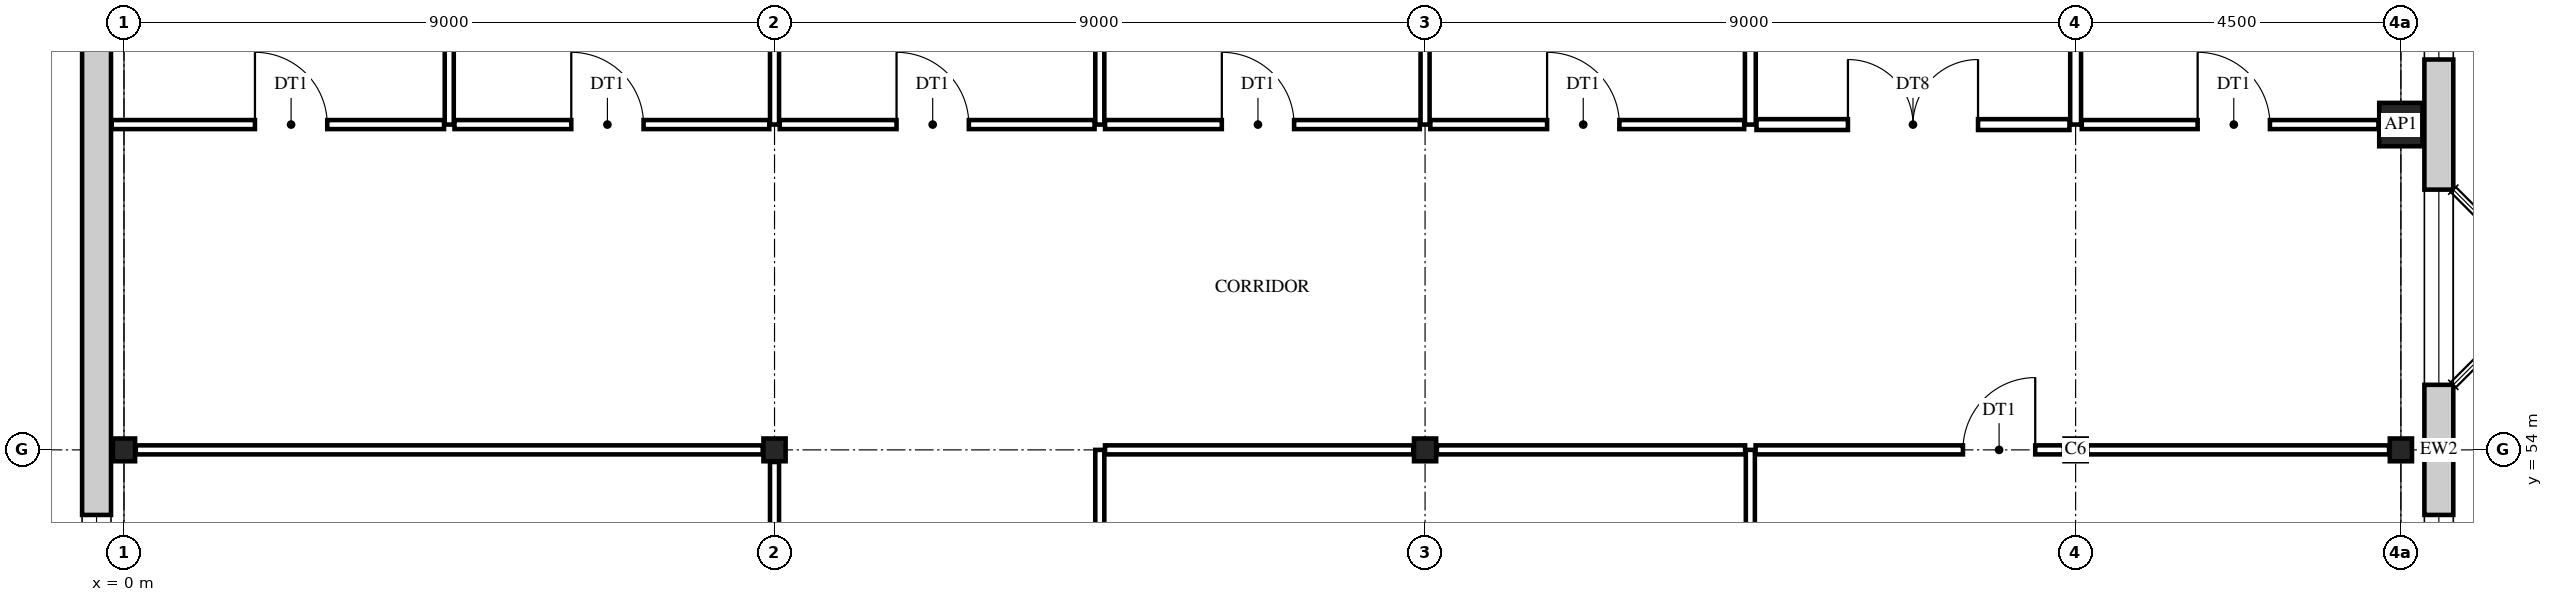
"""IFC4 building model, lengths in metres.
Left out: names, types, materials, properties, quantities, classifications, styles, units other than length and angle.
Written with IfcOpenShell. Run it as: python <this file> out.ifc"""

import sys

from ifc_helpers import new_model, si_unit, direction, frame, frame_2d, origin, origin_2d, place, context, subcontext, project, spatial, rectangle, i_section, extrude, element, fill, save


model = new_model("IFC4")
c1 = context("Model", 3, precision=1e-05, world=origin(), true_north=direction((0.0, 1.0)))
c2 = subcontext(c1, "Body", "Model", "MODEL_VIEW")
j1 = project(units=[si_unit("LENGTHUNIT", "METRE"), si_unit("PLANEANGLEUNIT", "RADIAN")], contexts=[c1])
p1 = place(None, origin())
s1 = spatial("IfcSite", under=j1, at=p1, CompositionType="ELEMENT")
p2 = place(p1, origin())
s2 = spatial("IfcBuilding", under=s1, at=p2, CompositionType="ELEMENT")
p3 = place(p2, frame((0.0, 0.0, 10.5)))
s3 = spatial("IfcBuildingStorey", under=s2, at=p3, CompositionType="ELEMENT", Elevation=10.5)
for number, where, z_axis, x_axis in (
    (1, (0.0, 54.0, 0.0), (0.0, 0.0, 1.0), (1.0, 0.0, 0.0)),
    (2, (9.0, 54.0, 0.0), (0.0, 0.0, 1.0), (1.0, 0.0, 0.0)),
    (3, (18.0, 54.0, 0.0), (0.0, 0.0, 1.0), (1.0, 0.0, 0.0)),
    (4, (27.0, 54.0, 0.0), (0.0, 0.0, 1.0), (1.0, 0.0, 0.0)),
    (5, (31.5, 54.0, 0.0), (0.0, 0.0, 1.0), (1.0, 0.0, 0.0)),
):
    element("IfcColumn", number, at=place(p3, frame(where, z_axis=z_axis, x_axis=x_axis)), inside=s3, PredefinedType="COLUMN", context=c2, shape_type="SweptSolid", body=[
        extrude(i_section(OverallWidth=0.307, OverallDepth=0.315, WebThickness=0.012, FlangeThickness=0.019, FilletRadius=0.017, at=origin_2d()), origin(), (0.0, 0.0, 1.0), 4.5),
    ])
p4 = place(p3, frame((31.5, 58.5, 0.0), z_axis=(0.0, 0.0, 1.0), x_axis=(1.0, 0.0, 0.0)))
e6 = element("IfcColumn", 6, at=p4, inside=s3, PredefinedType="COLUMN", context=c2, shape_type="SweptSolid", body=[
    extrude(rectangle(XDim=0.6, YDim=0.6, at=origin_2d()), origin(), (0.0, 0.0, 1.0), 4.5),
])
p5 = place(p3, frame((-0.379, 35.821, 0.0), z_axis=(0.0, 0.0, 1.0), x_axis=(0.0, 1.0, 0.0)))
e7 = element("IfcWall", 7, at=p5, inside=s3, PredefinedType="STANDARD", context=c2, shape_type="SweptSolid", body=[
    extrude(rectangle(XDim=36.359, YDim=0.4, at=frame_2d((18.179, 0.0))), origin(), (0.0, 0.0, 1.0), 4.5),
])
p6 = place(p5, frame((10.08, 0.0, 0.9)))
e8 = element("IfcOpeningElement", 8, at=p6, cuts=e7, PredefinedType="OPENING", context=c2, shape_type="SweptSolid", body=[
    extrude(rectangle(XDim=2.7, YDim=2.8, at=frame_2d((1.35, 1.4))), frame((0.0, 0.21, 0.0), z_axis=(0.0, -1.0, 0.0), x_axis=(1.0, 0.0, 0.0)), (0.0, 0.0, 1.0), 0.42),
])
p7 = place(p5, frame((14.58, 0.0, 0.9)))
e9 = element("IfcOpeningElement", 9, at=p7, cuts=e7, PredefinedType="OPENING", context=c2, shape_type="SweptSolid", body=[
    extrude(rectangle(XDim=2.7, YDim=2.8, at=frame_2d((1.35, 1.4))), frame((0.0, 0.21, 0.0), z_axis=(0.0, -1.0, 0.0), x_axis=(1.0, 0.0, 0.0)), (0.0, 0.0, 1.0), 0.42),
])
p8 = place(p3, frame((32.025, 72.325, 0.0), z_axis=(0.0, 0.0, 1.0), x_axis=(0.0, -1.0, 0.0)))
e10 = element("IfcWall", 10, at=p8, inside=s3, PredefinedType="STANDARD", context=c2, shape_type="SweptSolid", body=[
    extrude(rectangle(XDim=36.65, YDim=0.4, at=frame_2d((18.325, 0.0))), origin(), (0.0, 0.0, 1.0), 4.5),
])
p9 = place(p8, frame((32.725, 0.0, 0.9)))
e11 = element("IfcOpeningElement", 11, at=p9, cuts=e10, PredefinedType="OPENING", context=c2, shape_type="SweptSolid", body=[
    extrude(rectangle(XDim=2.7, YDim=2.8, at=frame_2d((1.35, 1.4))), frame((0.0, 0.21, 0.0), z_axis=(0.0, -1.0, 0.0), x_axis=(1.0, 0.0, 0.0)), (0.0, 0.0, 1.0), 0.42),
])
p10 = place(p8, frame((28.225, 0.0, 0.9)))
e12 = element("IfcOpeningElement", 12, at=p10, cuts=e10, PredefinedType="OPENING", context=c2, shape_type="SweptSolid", body=[
    extrude(rectangle(XDim=2.7, YDim=2.8, at=frame_2d((1.35, 1.4))), frame((0.0, 0.21, 0.0), z_axis=(0.0, -1.0, 0.0), x_axis=(1.0, 0.0, 0.0)), (0.0, 0.0, 1.0), 0.42),
])
p11 = place(p8, frame((23.725, 0.0, 0.9)))
e13 = element("IfcOpeningElement", 13, at=p11, cuts=e10, PredefinedType="OPENING", context=c2, shape_type="SweptSolid", body=[
    extrude(rectangle(XDim=2.7, YDim=2.8, at=frame_2d((1.35, 1.4))), frame((0.0, 0.21, 0.0), z_axis=(0.0, -1.0, 0.0), x_axis=(1.0, 0.0, 0.0)), (0.0, 0.0, 1.0), 0.42),
])
p12 = place(p8, frame((19.225, 0.0, 0.9)))
e14 = element("IfcOpeningElement", 14, at=p12, cuts=e10, PredefinedType="OPENING", context=c2, shape_type="SweptSolid", body=[
    extrude(rectangle(XDim=2.7, YDim=2.8, at=frame_2d((1.35, 1.4))), frame((0.0, 0.21, 0.0), z_axis=(0.0, -1.0, 0.0), x_axis=(1.0, 0.0, 0.0)), (0.0, 0.0, 1.0), 0.42),
])
p13 = place(p8, frame((14.725, 0.0, 0.9)))
e15 = element("IfcOpeningElement", 15, at=p13, cuts=e10, PredefinedType="OPENING", context=c2, shape_type="SweptSolid", body=[
    extrude(rectangle(XDim=2.7, YDim=2.8, at=frame_2d((1.35, 1.4))), frame((0.0, 0.21, 0.0), z_axis=(0.0, -1.0, 0.0), x_axis=(1.0, 0.0, 0.0)), (0.0, 0.0, 1.0), 0.42),
])
p14 = place(p8, frame((10.225, 0.0, 0.9)))
e16 = element("IfcOpeningElement", 16, at=p14, cuts=e10, PredefinedType="OPENING", context=c2, shape_type="SweptSolid", body=[
    extrude(rectangle(XDim=2.7, YDim=2.8, at=frame_2d((1.35, 1.4))), frame((0.0, 0.21, 0.0), z_axis=(0.0, -1.0, 0.0), x_axis=(1.0, 0.0, 0.0)), (0.0, 0.0, 1.0), 0.42),
])
p15 = place(p8, frame((5.725, 0.0, 0.9)))
e17 = element("IfcOpeningElement", 17, at=p15, cuts=e10, PredefinedType="OPENING", context=c2, shape_type="SweptSolid", body=[
    extrude(rectangle(XDim=2.7, YDim=2.8, at=frame_2d((1.35, 1.4))), frame((0.0, 0.21, 0.0), z_axis=(0.0, -1.0, 0.0), x_axis=(1.0, 0.0, 0.0)), (0.0, 0.0, 1.0), 0.42),
])
p16 = place(p8, frame((1.225, 0.0, 0.9)))
e18 = element("IfcOpeningElement", 18, at=p16, cuts=e10, PredefinedType="OPENING", context=c2, shape_type="SweptSolid", body=[
    extrude(rectangle(XDim=2.7, YDim=2.8, at=frame_2d((1.35, 1.4))), frame((0.0, 0.21, 0.0), z_axis=(0.0, -1.0, 0.0), x_axis=(1.0, 0.0, 0.0)), (0.0, 0.0, 1.0), 0.42),
])
p17 = place(p3, frame((4.5, 58.5, 0.0), z_axis=(0.0, 0.0, 1.0), x_axis=(0.0, 1.0, 0.0)))
e19 = element("IfcWall", 19, at=p17, inside=s3, PredefinedType="PARTITIONING", context=c2, shape_type="SweptSolid", body=[
    extrude(rectangle(XDim=13.676, YDim=0.125, at=frame_2d((6.838, 0.0))), origin(), (0.0, 0.0, 1.0), 3.822),
])
p18 = place(p3, frame((9.0, 45.167, 0.0), z_axis=(0.0, 0.0, 1.0), x_axis=(0.0, 1.0, 0.0)))
e20 = element("IfcWall", 20, at=p18, inside=s3, PredefinedType="PARTITIONING", context=c2, shape_type="SweptSolid", body=[
    extrude(rectangle(XDim=8.665, YDim=0.125, at=frame_2d((4.333, 0.0))), origin(), (0.0, 0.0, 1.0), 3.822),
])
p19 = place(p18, frame((3.77, 0.0, 0.0)))
e21 = element("IfcOpeningElement", 21, at=p19, cuts=e20, PredefinedType="OPENING", context=c2, shape_type="SweptSolid", body=[
    extrude(rectangle(XDim=1.0, YDim=2.1, at=frame_2d((0.5, 1.05))), frame((0.0, 0.073, 0.0), z_axis=(0.0, -1.0, 0.0), x_axis=(1.0, 0.0, 0.0)), (0.0, 0.0, 1.0), 0.145),
])
p20 = place(p3, frame((9.0, 58.5, 0.0), z_axis=(0.0, 0.0, 1.0), x_axis=(0.0, 1.0, 0.0)))
e22 = element("IfcWall", 22, at=p20, inside=s3, PredefinedType="PARTITIONING", context=c2, shape_type="SweptSolid", body=[
    extrude(rectangle(XDim=4.333, YDim=0.125, at=frame_2d((2.166, 0.0))), origin(), (0.0, 0.0, 1.0), 3.822),
])
p21 = place(p3, frame((13.5, 45.0, 0.0), z_axis=(0.0, 0.0, 1.0), x_axis=(0.0, 1.0, 0.0)))
e23 = element("IfcWall", 23, at=p21, inside=s3, PredefinedType="PARTITIONING", context=c2, shape_type="SweptSolid", body=[
    extrude(rectangle(XDim=9.0, YDim=0.125, at=frame_2d((4.5, 0.0))), origin(), (0.0, 0.0, 1.0), 3.822),
])
p22 = place(p21, frame((3.938, 0.0, 0.0)))
e24 = element("IfcOpeningElement", 24, at=p22, cuts=e23, PredefinedType="OPENING", context=c2, shape_type="SweptSolid", body=[
    extrude(rectangle(XDim=1.0, YDim=2.1, at=frame_2d((0.5, 1.05))), frame((0.0, 0.073, 0.0), z_axis=(0.0, -1.0, 0.0), x_axis=(1.0, 0.0, 0.0)), (0.0, 0.0, 1.0), 0.145),
])
p23 = place(p3, frame((13.5, 58.5, 0.0), z_axis=(0.0, 0.0, 1.0), x_axis=(0.0, 1.0, 0.0)))
e25 = element("IfcWall", 25, at=p23, inside=s3, PredefinedType="PARTITIONING", context=c2, shape_type="SweptSolid", body=[
    extrude(rectangle(XDim=13.676, YDim=0.125, at=frame_2d((6.838, 0.0))), origin(), (0.0, 0.0, 1.0), 3.822),
])
p24 = place(p3, frame((18.0, 58.5, 0.0), z_axis=(0.0, 0.0, 1.0), x_axis=(0.0, 1.0, 0.0)))
e26 = element("IfcWall", 26, at=p24, inside=s3, PredefinedType="PARTITIONING", context=c2, shape_type="SweptSolid", body=[
    extrude(rectangle(XDim=4.333, YDim=0.125, at=frame_2d((2.166, 0.0))), origin(), (0.0, 0.0, 1.0), 3.822),
])
p25 = place(p3, frame((22.5, 45.0, 0.0), z_axis=(0.0, 0.0, 1.0), x_axis=(0.0, 1.0, 0.0)))
e27 = element("IfcWall", 27, at=p25, inside=s3, PredefinedType="PARTITIONING", context=c2, shape_type="SweptSolid", body=[
    extrude(rectangle(XDim=9.0, YDim=0.125, at=frame_2d((4.5, 0.0))), origin(), (0.0, 0.0, 1.0), 3.822),
])
for number, where, z_axis, x_axis in (
    (28, (22.5, 58.5, 0.0), (0.0, 0.0, 1.0), (0.0, 1.0, 0.0)),
    (29, (27.0, 58.5, 0.0), (0.0, 0.0, 1.0), (0.0, 1.0, 0.0)),
):
    element("IfcWall", number, at=place(p3, frame(where, z_axis=z_axis, x_axis=x_axis)), inside=s3, PredefinedType="PARTITIONING", context=c2, shape_type="SweptSolid", body=[
        extrude(rectangle(XDim=4.34, YDim=0.15, at=frame_2d((2.17, 0.0))), origin(), (0.0, 0.0, 1.0), 3.822),
    ])
p26 = place(p3, frame((0.164, 54.0, 0.0), z_axis=(0.0, 0.0, 1.0), x_axis=(1.0, 0.0, 0.0)))
e30 = element("IfcWall", 30, at=p26, inside=s3, PredefinedType="PARTITIONING", context=c2, shape_type="SweptSolid", body=[
    extrude(rectangle(XDim=8.673, YDim=0.125, at=frame_2d((4.336, 0.0))), origin(), (0.0, 0.0, 1.0), 3.822),
])
for number, where, z_axis, x_axis in (
    (31, (13.573, 54.0, 0.0), (0.0, 0.0, 1.0), (1.0, 0.0, 0.0)),
    (32, (18.164, 54.0, 0.0), (0.0, 0.0, 1.0), (1.0, 0.0, 0.0)),
):
    element("IfcWall", number, at=place(p3, frame(where, z_axis=z_axis, x_axis=x_axis)), inside=s3, PredefinedType="PARTITIONING", context=c2, shape_type="SweptSolid", body=[
        extrude(rectangle(XDim=4.264, YDim=0.125, at=frame_2d((2.132, 0.0))), origin(), (0.0, 0.0, 1.0), 3.822),
    ])
p27 = place(p3, frame((22.573, 54.0, 0.0), z_axis=(0.0, 0.0, 1.0), x_axis=(1.0, 0.0, 0.0)))
e33 = element("IfcWall", 33, at=p27, inside=s3, PredefinedType="PARTITIONING", context=c2, shape_type="SweptSolid", body=[
    extrude(rectangle(XDim=4.264, YDim=0.125, at=frame_2d((2.132, 0.0))), origin(), (0.0, 0.0, 1.0), 3.822),
])
p28 = place(p27, frame((2.869, 0.0, 0.0)))
e34 = element("IfcOpeningElement", 34, at=p28, cuts=e33, PredefinedType="OPENING", context=c2, shape_type="SweptSolid", body=[
    extrude(rectangle(XDim=1.0, YDim=2.1, at=frame_2d((0.5, 1.05))), frame((0.0, 0.073, 0.0), z_axis=(0.0, -1.0, 0.0), x_axis=(1.0, 0.0, 0.0)), (0.0, 0.0, 1.0), 0.145),
])
p29 = place(p3, frame((27.164, 54.0, 0.0), z_axis=(0.0, 0.0, 1.0), x_axis=(1.0, 0.0, 0.0)))
e35 = element("IfcWall", 35, at=p29, inside=s3, PredefinedType="PARTITIONING", context=c2, shape_type="SweptSolid", body=[
    extrude(rectangle(XDim=4.173, YDim=0.125, at=frame_2d((2.086, 0.0))), origin(), (0.0, 0.0, 1.0), 3.822),
])
p30 = place(p3, frame((-0.169, 58.5, 0.0), z_axis=(0.0, 0.0, 1.0), x_axis=(1.0, 0.0, 0.0)))
e36 = element("IfcWall", 36, at=p30, inside=s3, PredefinedType="PARTITIONING", context=c2, shape_type="SweptSolid", body=[
    extrude(rectangle(XDim=4.597, YDim=0.125, at=frame_2d((2.298, 0.0))), origin(), (0.0, 0.0, 1.0), 3.822),
])
p31 = place(p30, frame((1.981, 0.0, 0.0)))
e37 = element("IfcOpeningElement", 37, at=p31, cuts=e36, PredefinedType="OPENING", context=c2, shape_type="SweptSolid", body=[
    extrude(rectangle(XDim=1.0, YDim=2.1, at=frame_2d((0.5, 1.05))), frame((0.0, 0.073, 0.0), z_axis=(0.0, -1.0, 0.0), x_axis=(1.0, 0.0, 0.0)), (0.0, 0.0, 1.0), 0.145),
])
p32 = place(p3, frame((4.573, 58.5, 0.0), z_axis=(0.0, 0.0, 1.0), x_axis=(1.0, 0.0, 0.0)))
e38 = element("IfcWall", 38, at=p32, inside=s3, PredefinedType="PARTITIONING", context=c2, shape_type="SweptSolid", body=[
    extrude(rectangle(XDim=4.355, YDim=0.125, at=frame_2d((2.177, 0.0))), origin(), (0.0, 0.0, 1.0), 3.822),
])
p33 = place(p32, frame((1.615, 0.0, 0.0)))
e39 = element("IfcOpeningElement", 39, at=p33, cuts=e38, PredefinedType="OPENING", context=c2, shape_type="SweptSolid", body=[
    extrude(rectangle(XDim=1.0, YDim=2.1, at=frame_2d((0.5, 1.05))), frame((0.0, 0.073, 0.0), z_axis=(0.0, -1.0, 0.0), x_axis=(1.0, 0.0, 0.0)), (0.0, 0.0, 1.0), 0.145),
])
p34 = place(p3, frame((9.073, 58.5, 0.0), z_axis=(0.0, 0.0, 1.0), x_axis=(1.0, 0.0, 0.0)))
e40 = element("IfcWall", 40, at=p34, inside=s3, PredefinedType="PARTITIONING", context=c2, shape_type="SweptSolid", body=[
    extrude(rectangle(XDim=4.355, YDim=0.125, at=frame_2d((2.177, 0.0))), origin(), (0.0, 0.0, 1.0), 3.822),
])
p35 = place(p34, frame((1.615, 0.0, 0.0)))
e41 = element("IfcOpeningElement", 41, at=p35, cuts=e40, PredefinedType="OPENING", context=c2, shape_type="SweptSolid", body=[
    extrude(rectangle(XDim=1.0, YDim=2.1, at=frame_2d((0.5, 1.05))), frame((0.0, 0.073, 0.0), z_axis=(0.0, -1.0, 0.0), x_axis=(1.0, 0.0, 0.0)), (0.0, 0.0, 1.0), 0.145),
])
p36 = place(p3, frame((13.573, 58.5, 0.0), z_axis=(0.0, 0.0, 1.0), x_axis=(1.0, 0.0, 0.0)))
e42 = element("IfcWall", 42, at=p36, inside=s3, PredefinedType="PARTITIONING", context=c2, shape_type="SweptSolid", body=[
    extrude(rectangle(XDim=4.355, YDim=0.125, at=frame_2d((2.177, 0.0))), origin(), (0.0, 0.0, 1.0), 3.822),
])
p37 = place(p36, frame((1.615, 0.0, 0.0)))
e43 = element("IfcOpeningElement", 43, at=p37, cuts=e42, PredefinedType="OPENING", context=c2, shape_type="SweptSolid", body=[
    extrude(rectangle(XDim=1.0, YDim=2.1, at=frame_2d((0.5, 1.05))), frame((0.0, 0.073, 0.0), z_axis=(0.0, -1.0, 0.0), x_axis=(1.0, 0.0, 0.0)), (0.0, 0.0, 1.0), 0.145),
])
p38 = place(p3, frame((18.073, 58.5, 0.0), z_axis=(0.0, 0.0, 1.0), x_axis=(1.0, 0.0, 0.0)))
e44 = element("IfcWall", 44, at=p38, inside=s3, PredefinedType="PARTITIONING", context=c2, shape_type="SweptSolid", body=[
    extrude(rectangle(XDim=4.343, YDim=0.125, at=frame_2d((2.171, 0.0))), origin(), (0.0, 0.0, 1.0), 3.822),
])
p39 = place(p38, frame((1.615, 0.0, 0.0)))
e45 = element("IfcOpeningElement", 45, at=p39, cuts=e44, PredefinedType="OPENING", context=c2, shape_type="SweptSolid", body=[
    extrude(rectangle(XDim=1.0, YDim=2.1, at=frame_2d((0.5, 1.05))), frame((0.0, 0.073, 0.0), z_axis=(0.0, -1.0, 0.0), x_axis=(1.0, 0.0, 0.0)), (0.0, 0.0, 1.0), 0.145),
])
p40 = place(p3, frame((22.585, 58.5, 0.0), z_axis=(0.0, 0.0, 1.0), x_axis=(1.0, 0.0, 0.0)))
e46 = element("IfcWall", 46, at=p40, inside=s3, PredefinedType="PARTITIONING", context=c2, shape_type="SweptSolid", body=[
    extrude(rectangle(XDim=4.33, YDim=0.15, at=frame_2d((2.165, 0.0))), origin(), (0.0, 0.0, 1.0), 3.822),
])
p41 = place(p40, frame((1.265, 0.0, 0.0)))
e47 = element("IfcOpeningElement", 47, at=p41, cuts=e46, PredefinedType="OPENING", context=c2, shape_type="SweptSolid", body=[
    extrude(rectangle(XDim=1.8, YDim=2.1, at=frame_2d((0.9, 1.05))), frame((0.0, 0.085, 0.0), z_axis=(0.0, -1.0, 0.0), x_axis=(1.0, 0.0, 0.0)), (0.0, 0.0, 1.0), 0.17),
])
p42 = place(p3, frame((27.085, 58.5, 0.0), z_axis=(0.0, 0.0, 1.0), x_axis=(1.0, 0.0, 0.0)))
e48 = element("IfcWall", 48, at=p42, inside=s3, PredefinedType="PARTITIONING", context=c2, shape_type="SweptSolid", body=[
    extrude(rectangle(XDim=4.105, YDim=0.125, at=frame_2d((2.052, 0.0))), origin(), (0.0, 0.0, 1.0), 3.822),
])
p43 = place(p42, frame((1.603, 0.0, 0.0)))
e49 = element("IfcOpeningElement", 49, at=p43, cuts=e48, PredefinedType="OPENING", context=c2, shape_type="SweptSolid", body=[
    extrude(rectangle(XDim=1.0, YDim=2.1, at=frame_2d((0.5, 1.05))), frame((0.0, 0.073, 0.0), z_axis=(0.0, -1.0, 0.0), x_axis=(1.0, 0.0, 0.0)), (0.0, 0.0, 1.0), 0.145),
])
p44 = place(p7, origin())
e50 = element("IfcWindow", 50, at=p44, inside=s3, PartitioningType="SINGLE_PANEL", PredefinedType="WINDOW", context=c2, shape_type="SweptSolid", body=[
    extrude(rectangle(XDim=2.7, YDim=2.8, at=frame_2d((1.35, 1.4))), frame((0.0, 0.03, 0.0), z_axis=(0.0, -1.0, 0.0), x_axis=(1.0, 0.0, 0.0)), (0.0, 0.0, 1.0), 0.06),
])
fill(e9, e50)
p45 = place(p12, origin())
e51 = element("IfcWindow", 51, at=p45, inside=s3, PartitioningType="SINGLE_PANEL", PredefinedType="WINDOW", context=c2, shape_type="SweptSolid", body=[
    extrude(rectangle(XDim=2.7, YDim=2.8, at=frame_2d((1.35, 1.4))), frame((0.0, 0.03, 0.0), z_axis=(0.0, -1.0, 0.0), x_axis=(1.0, 0.0, 0.0)), (0.0, 0.0, 1.0), 0.06),
])
fill(e14, e51)
p46 = place(p13, origin())
e52 = element("IfcWindow", 52, at=p46, inside=s3, PartitioningType="SINGLE_PANEL", PredefinedType="WINDOW", context=c2, shape_type="SweptSolid", body=[
    extrude(rectangle(XDim=2.7, YDim=2.8, at=frame_2d((1.35, 1.4))), frame((0.0, 0.03, 0.0), z_axis=(0.0, -1.0, 0.0), x_axis=(1.0, 0.0, 0.0)), (0.0, 0.0, 1.0), 0.06),
])
fill(e15, e52)
p47 = place(p14, origin())
e53 = element("IfcWindow", 53, at=p47, inside=s3, PartitioningType="SINGLE_PANEL", PredefinedType="WINDOW", context=c2, shape_type="SweptSolid", body=[
    extrude(rectangle(XDim=2.7, YDim=2.8, at=frame_2d((1.35, 1.4))), frame((0.0, 0.03, 0.0), z_axis=(0.0, -1.0, 0.0), x_axis=(1.0, 0.0, 0.0)), (0.0, 0.0, 1.0), 0.06),
])
fill(e16, e53)
p48 = place(p41, frame((1.8, 0.0, 0.0), z_axis=(0.0, 0.0, 1.0), x_axis=(-1.0, 0.0, 0.0)))
e54 = element("IfcDoor", 54, at=p48, inside=s3, OperationType="DOUBLE_DOOR_SINGLE_SWING", PredefinedType="DOOR", context=c2, shape_type="SweptSolid", body=[
    extrude(rectangle(XDim=1.8, YDim=2.1, at=frame_2d((0.9, 1.05))), frame((0.0, 0.025, 0.0), z_axis=(0.0, -1.0, 0.0), x_axis=(1.0, 0.0, 0.0)), (0.0, 0.0, 1.0), 0.05),
])
fill(e47, e54)
p49 = place(p28, frame((1.0, 0.0, 0.0), z_axis=(0.0, 0.0, 1.0), x_axis=(-1.0, 0.0, 0.0)))
e55 = element("IfcDoor", 55, at=p49, inside=s3, OperationType="SINGLE_SWING_RIGHT", PredefinedType="DOOR", context=c2, shape_type="SweptSolid", body=[
    extrude(rectangle(XDim=1.0, YDim=2.1, at=frame_2d((0.5, 1.05))), frame((0.0, 0.025, 0.0), z_axis=(0.0, -1.0, 0.0), x_axis=(1.0, 0.0, 0.0)), (0.0, 0.0, 1.0), 0.05),
])
fill(e34, e55)
p50 = place(p31, origin())
e56 = element("IfcDoor", 56, at=p50, inside=s3, OperationType="SINGLE_SWING_LEFT", PredefinedType="DOOR", context=c2, shape_type="SweptSolid", body=[
    extrude(rectangle(XDim=1.0, YDim=2.1, at=frame_2d((0.5, 1.05))), frame((0.0, 0.025, 0.0), z_axis=(0.0, -1.0, 0.0), x_axis=(1.0, 0.0, 0.0)), (0.0, 0.0, 1.0), 0.05),
])
fill(e37, e56)
p51 = place(p33, origin())
e57 = element("IfcDoor", 57, at=p51, inside=s3, OperationType="SINGLE_SWING_LEFT", PredefinedType="DOOR", context=c2, shape_type="SweptSolid", body=[
    extrude(rectangle(XDim=1.0, YDim=2.1, at=frame_2d((0.5, 1.05))), frame((0.0, 0.025, 0.0), z_axis=(0.0, -1.0, 0.0), x_axis=(1.0, 0.0, 0.0)), (0.0, 0.0, 1.0), 0.05),
])
fill(e39, e57)
p52 = place(p35, origin())
e58 = element("IfcDoor", 58, at=p52, inside=s3, OperationType="SINGLE_SWING_LEFT", PredefinedType="DOOR", context=c2, shape_type="SweptSolid", body=[
    extrude(rectangle(XDim=1.0, YDim=2.1, at=frame_2d((0.5, 1.05))), frame((0.0, 0.025, 0.0), z_axis=(0.0, -1.0, 0.0), x_axis=(1.0, 0.0, 0.0)), (0.0, 0.0, 1.0), 0.05),
])
fill(e41, e58)
p53 = place(p37, origin())
e59 = element("IfcDoor", 59, at=p53, inside=s3, OperationType="SINGLE_SWING_LEFT", PredefinedType="DOOR", context=c2, shape_type="SweptSolid", body=[
    extrude(rectangle(XDim=1.0, YDim=2.1, at=frame_2d((0.5, 1.05))), frame((0.0, 0.025, 0.0), z_axis=(0.0, -1.0, 0.0), x_axis=(1.0, 0.0, 0.0)), (0.0, 0.0, 1.0), 0.05),
])
fill(e43, e59)
p54 = place(p39, origin())
e60 = element("IfcDoor", 60, at=p54, inside=s3, OperationType="SINGLE_SWING_LEFT", PredefinedType="DOOR", context=c2, shape_type="SweptSolid", body=[
    extrude(rectangle(XDim=1.0, YDim=2.1, at=frame_2d((0.5, 1.05))), frame((0.0, 0.025, 0.0), z_axis=(0.0, -1.0, 0.0), x_axis=(1.0, 0.0, 0.0)), (0.0, 0.0, 1.0), 0.05),
])
fill(e45, e60)
p55 = place(p43, origin())
e61 = element("IfcDoor", 61, at=p55, inside=s3, OperationType="SINGLE_SWING_LEFT", PredefinedType="DOOR", context=c2, shape_type="SweptSolid", body=[
    extrude(rectangle(XDim=1.0, YDim=2.1, at=frame_2d((0.5, 1.05))), frame((0.0, 0.025, 0.0), z_axis=(0.0, -1.0, 0.0), x_axis=(1.0, 0.0, 0.0)), (0.0, 0.0, 1.0), 0.05),
])
fill(e49, e61)
save(model, sys.argv[1])
